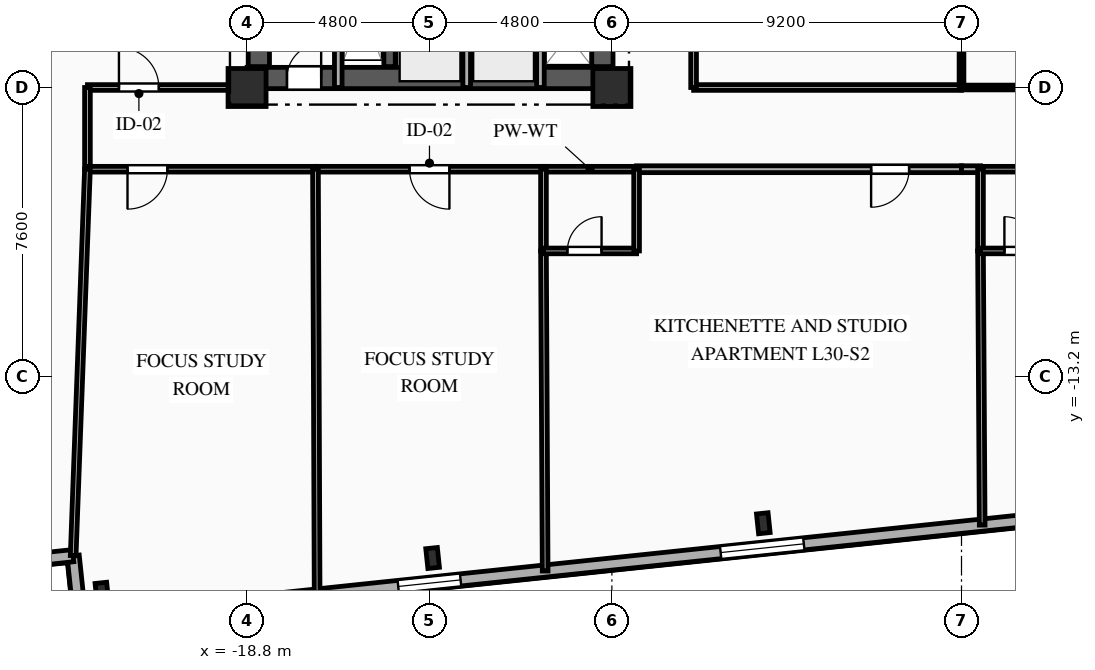
"""IFC4 building model, lengths in metres.
Left out: names, types, materials, properties, quantities, classifications, styles, units other than length and angle.
Written with IfcOpenShell. Run it as: python <this file> out.ifc"""

import sys

from ifc_helpers import new_model, si_unit, direction, frame, frame_2d, origin, origin_2d, place, context, subcontext, project, spatial, rectangle, i_section, extrude, element, fill, save


model = new_model("IFC4")
c1 = context("Model", 3, precision=1e-05, world=origin(), true_north=direction((0.0, 1.0)))
c2 = subcontext(c1, "Body", "Model", "MODEL_VIEW")
j1 = project(units=[si_unit("LENGTHUNIT", "METRE"), si_unit("PLANEANGLEUNIT", "RADIAN")], contexts=[c1])
p1 = place(None, origin())
s1 = spatial("IfcSite", under=j1, at=p1, CompositionType="ELEMENT")
p2 = place(p1, origin())
s2 = spatial("IfcBuilding", under=s1, at=p2, CompositionType="ELEMENT")
p3 = place(p2, frame((0.0, 0.0, 109.15)))
s3 = spatial("IfcBuildingStorey", under=s2, at=p3, CompositionType="ELEMENT", Elevation=109.15)
for number, where, z_axis, x_axis in (
    (1, (-18.8, -5.6, 0.0), (0.0, 0.0, 1.0), (1.0, 0.0, 0.0)),
    (2, (-9.2, -5.6, 0.0), (0.0, 0.0, 1.0), (1.0, 0.0, 0.0)),
):
    element("IfcColumn", number, at=place(p3, frame(where, z_axis=z_axis, x_axis=x_axis)), inside=s3, PredefinedType="COLUMN", context=c2, shape_type="SweptSolid", body=[
        extrude(rectangle(XDim=1.0, YDim=1.0, at=origin_2d()), origin(), (0.0, 0.0, 1.0), 3.35),
    ])
for number, where, z_axis, x_axis in (
    (3, (-22.619, -18.895, 0.0), (0.0, 0.0, 1.0), (0.995, 0.105, 0.0)),
    (4, (-13.917, -17.98, 0.0), (0.0, 0.0, 1.0), (0.995, 0.105, 0.0)),
    (5, (-5.215, -17.066, 0.0), (0.0, 0.0, 1.0), (0.995, 0.105, 0.0)),
):
    element("IfcColumn", number, at=place(p3, frame(where, z_axis=z_axis, x_axis=x_axis)), inside=s3, PredefinedType="COLUMN", context=c2, shape_type="SweptSolid", body=[
        extrude(i_section(OverallWidth=0.306, OverallDepth=0.524, WebThickness=0.021, FlangeThickness=0.04, FilletRadius=0.027, at=origin_2d()), origin(), (0.0, 0.0, 1.0), 3.35),
    ])
for number, where, z_axis, x_axis in (
    (6, (-23.198, -19.609, 0.0), (0.0, 0.0, 1.0), (-0.105, 0.995, 0.0)),
    (7, (-23.376, -17.919, 0.0), (0.0, 0.0, 1.0), (-0.995, -0.105, 0.0)),
):
    element("IfcWall", number, at=place(p3, frame(where, z_axis=z_axis, x_axis=x_axis)), inside=s3, PredefinedType="SOLIDWALL", context=c2, shape_type="SweptSolid", body=[
        extrude(rectangle(XDim=1.7, YDim=0.32, at=frame_2d((0.85, 0.0))), origin(), (0.0, 0.0, 1.0), 3.045),
    ])
p4 = place(p3, frame((30.307, -13.986, 0.0), z_axis=(0.0, 0.0, 1.0), x_axis=(-0.994521628355, -0.104531003701, 0.0)))
e8 = element("IfcWall", 8, at=p4, inside=s3, PredefinedType="SOLIDWALL", context=c2, shape_type="SweptSolid", body=[
    extrude(rectangle(XDim=53.8, YDim=0.32, at=frame_2d((26.9, 0.0))), origin(), (0.0, 0.0, 1.0), 3.045),
])
p5 = place(p4, frame((3.098, 0.0, 0.85)))
e9 = element("IfcOpeningElement", 9, at=p5, cuts=e8, PredefinedType="OPENING", context=c2, shape_type="SweptSolid", body=[
    extrude(rectangle(XDim=1.65, YDim=1.85, at=frame_2d((0.825, 0.925))), frame((0.0, 0.17, 0.0), z_axis=(0.0, -1.0, 0.0), x_axis=(1.0, 0.0, 0.0)), (0.0, 0.0, 1.0), 0.34),
])
p6 = place(p4, frame((9.302, 0.0, 0.85)))
e10 = element("IfcOpeningElement", 10, at=p6, cuts=e8, PredefinedType="OPENING", context=c2, shape_type="SweptSolid", body=[
    extrude(rectangle(XDim=1.65, YDim=1.85, at=frame_2d((0.825, 0.925))), frame((0.0, 0.17, 0.0), z_axis=(0.0, -1.0, 0.0), x_axis=(1.0, 0.0, 0.0)), (0.0, 0.0, 1.0), 0.34),
])
p7 = place(p4, frame((14.827, 0.0, 0.85)))
e11 = element("IfcOpeningElement", 11, at=p7, cuts=e8, PredefinedType="OPENING", context=c2, shape_type="SweptSolid", body=[
    extrude(rectangle(XDim=1.65, YDim=1.85, at=frame_2d((0.825, 0.925))), frame((0.0, 0.17, 0.0), z_axis=(0.0, -1.0, 0.0), x_axis=(1.0, 0.0, 0.0)), (0.0, 0.0, 1.0), 0.34),
])
p8 = place(p4, frame((23.078, 0.0, 0.85)))
e12 = element("IfcOpeningElement", 12, at=p8, cuts=e8, PredefinedType="OPENING", context=c2, shape_type="SweptSolid", body=[
    extrude(rectangle(XDim=2.2, YDim=1.85, at=frame_2d((1.1, 0.925))), frame((0.0, 0.17, 0.0), z_axis=(0.0, -1.0, 0.0), x_axis=(1.0, 0.0, 0.0)), (0.0, 0.0, 1.0), 0.34),
])
p9 = place(p4, frame((34.646, 0.0, 0.85)))
e13 = element("IfcOpeningElement", 13, at=p9, cuts=e8, PredefinedType="OPENING", context=c2, shape_type="SweptSolid", body=[
    extrude(rectangle(XDim=2.2, YDim=1.85, at=frame_2d((1.1, 0.925))), frame((0.0, 0.17, 0.0), z_axis=(0.0, -1.0, 0.0), x_axis=(1.0, 0.0, 0.0)), (0.0, 0.0, 1.0), 0.34),
])
p10 = place(p4, frame((43.728, 0.0, 0.85)))
e14 = element("IfcOpeningElement", 14, at=p10, cuts=e8, PredefinedType="OPENING", context=c2, shape_type="SweptSolid", body=[
    extrude(rectangle(XDim=1.65, YDim=1.85, at=frame_2d((0.825, 0.925))), frame((0.0, 0.17, 0.0), z_axis=(0.0, -1.0, 0.0), x_axis=(1.0, 0.0, 0.0)), (0.0, 0.0, 1.0), 0.34),
])
p11 = place(p4, frame((49.653, 0.0, 0.85)))
e15 = element("IfcOpeningElement", 15, at=p11, cuts=e8, PredefinedType="OPENING", context=c2, shape_type="SweptSolid", body=[
    extrude(rectangle(XDim=1.65, YDim=1.85, at=frame_2d((0.825, 0.925))), frame((0.0, 0.17, 0.0), z_axis=(0.0, -1.0, 0.0), x_axis=(1.0, 0.0, 0.0)), (0.0, 0.0, 1.0), 0.34),
])
p12 = place(p3, frame((-18.8, -5.35, 0.0), z_axis=(0.0, 0.0, 1.0), x_axis=(1.0, 0.0, 0.0)))
e16 = element("IfcWall", 16, at=p12, inside=s3, PredefinedType="SHEAR", context=c2, shape_type="SweptSolid", body=[
    extrude(rectangle(XDim=9.6, YDim=0.56, at=frame_2d((4.8, 0.0))), origin(), (0.0, 0.0, 1.0), 3.045),
])
p13 = place(p12, frame((1.05, 0.0, 0.0)))
e17 = element("IfcOpeningElement", 17, at=p13, cuts=e16, PredefinedType="OPENING", context=c2, shape_type="SweptSolid", body=[
    extrude(rectangle(XDim=0.9, YDim=2.1, at=frame_2d((0.45, 1.05))), frame((0.0, 0.29, 0.0), z_axis=(0.0, -1.0, 0.0), x_axis=(1.0, 0.0, 0.0)), (0.0, 0.0, 1.0), 0.58),
])
p14 = place(p3, frame((-18.49, -5.05, 0.0), z_axis=(0.0, 0.0, 1.0), x_axis=(0.0, 1.0, 0.0)))
e18 = element("IfcWall", 18, at=p14, inside=s3, PredefinedType="SHEAR", context=c2, shape_type="SweptSolid", body=[
    extrude(rectangle(XDim=10.1, YDim=0.56, at=frame_2d((5.05, 0.0))), origin(), (0.0, 0.0, 1.0), 3.045),
])
p15 = place(p3, frame((-9.45, -5.05, 0.0), z_axis=(0.0, 0.0, 1.0), x_axis=(0.0, 1.0, 0.0)))
e19 = element("IfcWall", 19, at=p15, inside=s3, PredefinedType="SHEAR", context=c2, shape_type="SweptSolid", body=[
    extrude(rectangle(XDim=10.1, YDim=0.56, at=frame_2d((5.05, 0.0))), origin(), (0.0, 0.0, 1.0), 3.045),
])
p16 = place(p15, frame((7.15, 0.0, 0.0)))
e20 = element("IfcOpeningElement", 20, at=p16, cuts=e19, PredefinedType="OPENING", context=c2, shape_type="SweptSolid", body=[
    extrude(rectangle(XDim=0.9, YDim=2.1, at=frame_2d((0.45, 1.05))), frame((0.0, 0.29, 0.0), z_axis=(0.0, -1.0, 0.0), x_axis=(1.0, 0.0, 0.0)), (0.0, 0.0, 1.0), 0.58),
])
p17 = place(p15, frame((2.4, 0.0, 0.0)))
e21 = element("IfcOpeningElement", 21, at=p17, cuts=e19, PredefinedType="OPENING", context=c2, shape_type="SweptSolid", body=[
    extrude(rectangle(XDim=1.2, YDim=2.15, at=frame_2d((0.6, 1.075))), frame((0.0, 0.29, 0.0), z_axis=(0.0, -1.0, 0.0), x_axis=(1.0, 0.0, 0.0)), (0.0, 0.0, 1.0), 0.58),
])
p18 = place(p3, frame((-15.05, -5.05, 0.0), z_axis=(0.0, 0.0, 1.0), x_axis=(0.0, 1.0, 0.0)))
e22 = element("IfcWall", 22, at=p18, inside=s3, PredefinedType="SHEAR", context=c2, shape_type="SweptSolid", body=[
    extrude(rectangle(XDim=10.1, YDim=0.3, at=frame_2d((5.05, 0.0))), origin(), (0.0, 0.0, 1.0), 3.045),
])
p19 = place(p3, frame((-16.4, -5.6, 0.0), z_axis=(0.0, 0.0, 1.0), x_axis=(0.0, 1.0, 0.0)))
e23 = element("IfcWall", 23, at=p19, inside=s3, PredefinedType="PARTITIONING", context=c2, shape_type="SweptSolid", body=[
    extrude(rectangle(XDim=3.49, YDim=0.2, at=frame_2d((1.745, 0.0))), origin(), (0.0, 0.0, 1.0), 3.045),
])
for number, where, z_axis, x_axis in (
    (24, (-13.02, -5.6, 0.0), (0.0, 0.0, 1.0), (0.0, 1.0, 0.0)),
    (25, (-11.08, -5.6, 0.0), (0.0, 0.0, 1.0), (0.0, 1.0, 0.0)),
):
    element("IfcWall", number, at=place(p3, frame(where, z_axis=z_axis, x_axis=x_axis)), inside=s3, PredefinedType="PARTITIONING", context=c2, shape_type="SweptSolid", body=[
        extrude(rectangle(XDim=2.25, YDim=0.2, at=frame_2d((1.125, 0.0))), origin(), (0.0, 0.0, 1.0), 3.045),
    ])
p20 = place(p3, frame((-23.0, -5.6, 0.0), z_axis=(0.0, 0.0, 1.0), x_axis=(1.0, 0.0, 0.0)))
e26 = element("IfcWall", 26, at=p20, inside=s3, PredefinedType="PARTITIONING", context=c2, shape_type="SweptSolid", body=[
    extrude(rectangle(XDim=4.2, YDim=0.15, at=frame_2d((2.1, 0.0))), origin(), (0.0, 0.0, 1.0), 3.045),
])
p21 = place(p20, frame((0.829, 0.0, 0.0)))
e27 = element("IfcOpeningElement", 27, at=p21, cuts=e26, PredefinedType="OPENING", context=c2, shape_type="SweptSolid", body=[
    extrude(rectangle(XDim=1.05, YDim=2.15, at=frame_2d((0.525, 1.075))), frame((0.0, 0.085, 0.0), z_axis=(0.0, -1.0, 0.0), x_axis=(1.0, 0.0, 0.0)), (0.0, 0.0, 1.0), 0.17),
])
p22 = place(p3, frame((-23.0, -7.75, 0.0), z_axis=(0.0, 0.0, 1.0), x_axis=(0.0, 1.0, 0.0)))
e28 = element("IfcWall", 28, at=p22, inside=s3, PredefinedType="PARTITIONING", context=c2, shape_type="SweptSolid", body=[
    extrude(rectangle(XDim=2.15, YDim=0.15, at=frame_2d((1.075, 0.0))), origin(), (0.0, 0.0, 1.0), 2.7),
])
p23 = place(p3, frame((-17.0, -7.75, 0.0), z_axis=(0.0, 0.0, 1.0), x_axis=(-1.0, 0.0, 0.0)))
e29 = element("IfcWall", 29, at=p23, inside=s3, PredefinedType="PARTITIONING", context=c2, shape_type="SweptSolid", body=[
    extrude(rectangle(XDim=6.0, YDim=0.15, at=frame_2d((3.0, 0.0))), origin(), (0.0, 0.0, 1.0), 3.045),
])
p24 = place(p23, frame((3.896, 0.0, 0.0)))
e30 = element("IfcOpeningElement", 30, at=p24, cuts=e29, PredefinedType="OPENING", context=c2, shape_type="SweptSolid", body=[
    extrude(rectangle(XDim=1.05, YDim=2.15, at=frame_2d((0.525, 1.075))), frame((0.0, 0.085, 0.0), z_axis=(0.0, -1.0, 0.0), x_axis=(1.0, 0.0, 0.0)), (0.0, 0.0, 1.0), 0.17),
])
p25 = place(p3, frame((-11.0, -7.75, 0.0), z_axis=(0.0, 0.0, 1.0), x_axis=(-1.0, 0.0, 0.0)))
e31 = element("IfcWall", 31, at=p25, inside=s3, PredefinedType="PARTITIONING", context=c2, shape_type="SweptSolid", body=[
    extrude(rectangle(XDim=6.0, YDim=0.15, at=frame_2d((3.0, 0.0))), origin(), (0.0, 0.0, 1.0), 3.045),
])
p26 = place(p25, frame((2.475, 0.0, 0.0)))
e32 = element("IfcOpeningElement", 32, at=p26, cuts=e31, PredefinedType="OPENING", context=c2, shape_type="SweptSolid", body=[
    extrude(rectangle(XDim=1.05, YDim=2.15, at=frame_2d((0.525, 1.075))), frame((0.0, 0.085, 0.0), z_axis=(0.0, -1.0, 0.0), x_axis=(1.0, 0.0, 0.0)), (0.0, 0.0, 1.0), 0.17),
])
p27 = place(p3, frame((0.0, -7.75, 0.0), z_axis=(0.0, 0.0, 1.0), x_axis=(-1.0, 0.0, 0.0)))
e33 = element("IfcWall", 33, at=p27, inside=s3, PredefinedType="PARTITIONING", context=c2, shape_type="SweptSolid", body=[
    extrude(rectangle(XDim=8.55, YDim=0.18, at=frame_2d((4.275, 0.0))), origin(), (0.0, 0.0, 1.0), 3.045),
])
p28 = place(p27, frame((1.379, 0.0, 0.0)))
e34 = element("IfcOpeningElement", 34, at=p28, cuts=e33, PredefinedType="OPENING", context=c2, shape_type="SweptSolid", body=[
    extrude(rectangle(XDim=1.0, YDim=2.15, at=frame_2d((0.5, 1.075))), frame((0.0, 0.1, 0.0), z_axis=(0.0, -1.0, 0.0), x_axis=(1.0, 0.0, 0.0)), (0.0, 0.0, 1.0), 0.2),
])
p29 = place(p3, frame((-8.55, -7.75, 0.0), z_axis=(0.0, 0.0, 1.0), x_axis=(-1.0, 0.0, 0.0)))
e35 = element("IfcWall", 35, at=p29, inside=s3, PredefinedType="PLUMBINGWALL", context=c2, shape_type="SweptSolid", body=[
    extrude(rectangle(XDim=2.45, YDim=0.15, at=frame_2d((1.225, 0.0))), origin(), (0.0, 0.0, 1.0), 3.045),
])
p30 = place(p3, frame((-7.05, -5.6, 0.0), z_axis=(0.0, 0.0, 1.0), x_axis=(1.0, 0.0, 0.0)))
e36 = element("IfcWall", 36, at=p30, inside=s3, PredefinedType="PARTITIONING", context=c2, shape_type="SweptSolid", body=[
    extrude(rectangle(XDim=7.05, YDim=0.15, at=frame_2d((3.525, 0.0))), origin(), (0.0, 0.0, 1.0), 2.53),
])
p31 = place(p3, frame((0.5, -7.75, 0.0), z_axis=(0.0, 0.0, 1.0), x_axis=(-1.0, 0.0, 0.0)))
e37 = element("IfcWall", 37, at=p31, inside=s3, PredefinedType="PARTITIONING", context=c2, shape_type="SweptSolid", body=[
    extrude(rectangle(XDim=0.5, YDim=0.18, at=frame_2d((0.25, 0.0))), origin(), (0.0, 0.0, 1.0), 3.045),
])
p32 = place(p3, frame((2.95, -7.75, 0.0), z_axis=(0.0, 0.0, 1.0), x_axis=(-1.0, 0.0, 0.0)))
e38 = element("IfcWall", 38, at=p32, inside=s3, PredefinedType="PLUMBINGWALL", context=c2, shape_type="SweptSolid", body=[
    extrude(rectangle(XDim=2.45, YDim=0.15, at=frame_2d((1.225, 0.0))), origin(), (0.0, 0.0, 1.0), 3.045),
])
p33 = place(p3, frame((0.0, -5.6, 0.0), z_axis=(0.0, 0.0, 1.0), x_axis=(1.0, 0.0, 0.0)))
e39 = element("IfcWall", 39, at=p33, inside=s3, PredefinedType="PARTITIONING", context=c2, shape_type="SweptSolid", body=[
    extrude(rectangle(XDim=7.05, YDim=0.125, at=frame_2d((3.525, 0.0))), origin(), (0.0, 0.0, 1.0), 2.53),
])
p34 = place(p3, frame((-7.05, 8.5, 0.0), z_axis=(0.0, 0.0, 1.0), x_axis=(0.0, -1.0, 0.0)))
e40 = element("IfcWall", 40, at=p34, inside=s3, PredefinedType="PARTITIONING", context=c2, shape_type="SweptSolid", body=[
    extrude(rectangle(XDim=14.1, YDim=0.15, at=frame_2d((7.05, 0.0))), origin(), (0.0, 0.0, 1.0), 3.045),
])
p35 = place(p34, frame((8.074, 0.0, 0.0)))
e41 = element("IfcOpeningElement", 41, at=p35, cuts=e40, PredefinedType="OPENING", context=c2, shape_type="SweptSolid", body=[
    extrude(rectangle(XDim=0.95, YDim=2.1, at=frame_2d((0.475, 1.05))), frame((0.0, 0.085, 0.0), z_axis=(0.0, -1.0, 0.0), x_axis=(1.0, 0.0, 0.0)), (0.0, 0.0, 1.0), 0.17),
])
p36 = place(p3, frame((-23.0, -7.75, 0.0), z_axis=(0.0, 0.0, 1.0), x_axis=(-0.036924695214, -0.999318050914, 0.0)))
e42 = element("IfcWall", 42, at=p36, inside=s3, PredefinedType="PARTITIONING", context=c2, shape_type="SweptSolid", body=[
    extrude(rectangle(XDim=10.176, YDim=0.15, at=frame_2d((5.088, 0.0))), origin(), (0.0, 0.0, 1.0), 3.045),
])
p37 = place(p3, frame((-17.0, -7.75, 0.0), z_axis=(0.0, 0.0, 1.0), x_axis=(0.003922478487, -0.999992307052, 0.0)))
e43 = element("IfcWall", 43, at=p37, inside=s3, PredefinedType="PARTITIONING", context=c2, shape_type="SweptSolid", body=[
    extrude(rectangle(XDim=11.203, YDim=0.15, at=frame_2d((5.602, 0.0))), origin(), (0.0, 0.0, 1.0), 3.045),
])
p38 = place(p3, frame((-11.0, -9.9, 0.0), z_axis=(0.0, 0.0, 1.0), x_axis=(0.005217320294, -0.999986389692, 0.0)))
e44 = element("IfcWall", 44, at=p38, inside=s3, PredefinedType="PARTITIONING", context=c2, shape_type="SweptSolid", body=[
    extrude(rectangle(XDim=8.423, YDim=0.15, at=frame_2d((4.211, 0.0))), origin(), (0.0, 0.0, 1.0), 3.045),
])
p39 = place(p3, frame((-11.0, -7.75, 0.0), z_axis=(0.0, 0.0, 1.0), x_axis=(0.0, -1.0, 0.0)))
e45 = element("IfcWall", 45, at=p39, inside=s3, PredefinedType="PLUMBINGWALL", context=c2, shape_type="SweptSolid", body=[
    extrude(rectangle(XDim=2.15, YDim=0.15, at=frame_2d((1.075, 0.0))), origin(), (0.0, 0.0, 1.0), 3.045),
])
p40 = place(p3, frame((-11.0, -9.9, 0.0), z_axis=(0.0, 0.0, 1.0), x_axis=(1.0, 0.0, 0.0)))
e46 = element("IfcWall", 46, at=p40, inside=s3, PredefinedType="PLUMBINGWALL", context=c2, shape_type="SweptSolid", body=[
    extrude(rectangle(XDim=2.45, YDim=0.15, at=frame_2d((1.225, 0.0))), origin(), (0.0, 0.0, 1.0), 3.045),
])
p41 = place(p40, frame((0.629, 0.0, 0.0)))
e47 = element("IfcOpeningElement", 47, at=p41, cuts=e46, PredefinedType="OPENING", context=c2, shape_type="SweptSolid", body=[
    extrude(rectangle(XDim=0.9, YDim=2.1, at=frame_2d((0.45, 1.05))), frame((0.0, 0.085, 0.0), z_axis=(0.0, -1.0, 0.0), x_axis=(1.0, 0.0, 0.0)), (0.0, 0.0, 1.0), 0.17),
])
p42 = place(p3, frame((-8.55, -9.9, 0.0), z_axis=(0.0, 0.0, 1.0), x_axis=(0.0, 1.0, 0.0)))
e48 = element("IfcWall", 48, at=p42, inside=s3, PredefinedType="PLUMBINGWALL", context=c2, shape_type="SweptSolid", body=[
    extrude(rectangle(XDim=2.15, YDim=0.15, at=frame_2d((1.075, 0.0))), origin(), (0.0, 0.0, 1.0), 3.045),
])
p43 = place(p3, frame((0.5, -9.9, 0.0), z_axis=(0.0, 0.0, 1.0), x_axis=(0.006091463685, -0.999981446863, 0.0)))
e49 = element("IfcWall", 49, at=p43, inside=s3, PredefinedType="PARTITIONING", context=c2, shape_type="SweptSolid", body=[
    extrude(rectangle(XDim=7.214, YDim=0.15, at=frame_2d((3.607, 0.0))), origin(), (0.0, 0.0, 1.0), 3.045),
])
p44 = place(p3, frame((0.5, -7.75, 0.0), z_axis=(0.0, 0.0, 1.0), x_axis=(0.0, -1.0, 0.0)))
e50 = element("IfcWall", 50, at=p44, inside=s3, PredefinedType="PLUMBINGWALL", context=c2, shape_type="SweptSolid", body=[
    extrude(rectangle(XDim=2.15, YDim=0.15, at=frame_2d((1.075, 0.0))), origin(), (0.0, 0.0, 1.0), 3.045),
])
p45 = place(p3, frame((0.5, -9.9, 0.0), z_axis=(0.0, 0.0, 1.0), x_axis=(1.0, 0.0, 0.0)))
e51 = element("IfcWall", 51, at=p45, inside=s3, PredefinedType="PLUMBINGWALL", context=c2, shape_type="SweptSolid", body=[
    extrude(rectangle(XDim=2.45, YDim=0.15, at=frame_2d((1.225, 0.0))), origin(), (0.0, 0.0, 1.0), 3.045),
])
p46 = place(p45, frame((0.629, 0.0, 0.0)))
e52 = element("IfcOpeningElement", 52, at=p46, cuts=e51, PredefinedType="OPENING", context=c2, shape_type="SweptSolid", body=[
    extrude(rectangle(XDim=0.9, YDim=2.1, at=frame_2d((0.45, 1.05))), frame((0.0, 0.085, 0.0), z_axis=(0.0, -1.0, 0.0), x_axis=(1.0, 0.0, 0.0)), (0.0, 0.0, 1.0), 0.17),
])
p47 = place(p3, frame((0.0, 8.5, 0.0), z_axis=(0.0, 0.0, 1.0), x_axis=(0.0, -1.0, 0.0)))
e53 = element("IfcWall", 53, at=p47, inside=s3, PredefinedType="PARTITIONING", context=c2, shape_type="SweptSolid", body=[
    extrude(rectangle(XDim=14.1, YDim=0.125, at=frame_2d((7.05, 0.0))), origin(), (0.0, 0.0, 1.0), 3.045),
])
p48 = place(p9, origin())
e54 = element("IfcWindow", 54, at=p48, inside=s3, PartitioningType="SINGLE_PANEL", PredefinedType="WINDOW", context=c2, shape_type="SweptSolid", body=[
    extrude(rectangle(XDim=2.2, YDim=1.85, at=frame_2d((1.1, 0.925))), frame((0.0, 0.03, 0.0), z_axis=(0.0, -1.0, 0.0), x_axis=(1.0, 0.0, 0.0)), (0.0, 0.0, 1.0), 0.06),
])
fill(e13, e54)
p49 = place(p10, origin())
e55 = element("IfcWindow", 55, at=p49, inside=s3, PartitioningType="SINGLE_PANEL", PredefinedType="WINDOW", context=c2, shape_type="SweptSolid", body=[
    extrude(rectangle(XDim=1.65, YDim=1.85, at=frame_2d((0.825, 0.925))), frame((0.0, 0.03, 0.0), z_axis=(0.0, -1.0, 0.0), x_axis=(1.0, 0.0, 0.0)), (0.0, 0.0, 1.0), 0.06),
])
fill(e14, e55)
p50 = place(p13, origin())
e56 = element("IfcDoor", 56, at=p50, inside=s3, OperationType="SINGLE_SWING_RIGHT", PredefinedType="DOOR", context=c2, shape_type="SweptSolid", body=[
    extrude(rectangle(XDim=0.9, YDim=2.1, at=frame_2d((0.45, 1.05))), frame((0.0, 0.025, 0.0), z_axis=(0.0, -1.0, 0.0), x_axis=(1.0, 0.0, 0.0)), (0.0, 0.0, 1.0), 0.05),
])
fill(e17, e56)
p51 = place(p21, origin())
e57 = element("IfcDoor", 57, at=p51, inside=s3, OperationType="SINGLE_SWING_LEFT", PredefinedType="DOOR", context=c2, shape_type="SweptSolid", body=[
    extrude(rectangle(XDim=1.05, YDim=2.15, at=frame_2d((0.525, 1.075))), frame((0.0, 0.025, 0.0), z_axis=(0.0, -1.0, 0.0), x_axis=(1.0, 0.0, 0.0)), (0.0, 0.0, 1.0), 0.05),
])
fill(e27, e57)
p52 = place(p24, origin())
e58 = element("IfcDoor", 58, at=p52, inside=s3, OperationType="SINGLE_SWING_RIGHT", PredefinedType="DOOR", context=c2, shape_type="SweptSolid", body=[
    extrude(rectangle(XDim=1.05, YDim=2.15, at=frame_2d((0.525, 1.075))), frame((0.0, 0.025, 0.0), z_axis=(0.0, -1.0, 0.0), x_axis=(1.0, 0.0, 0.0)), (0.0, 0.0, 1.0), 0.05),
])
fill(e30, e58)
p53 = place(p26, origin())
e59 = element("IfcDoor", 59, at=p53, inside=s3, OperationType="SINGLE_SWING_LEFT", PredefinedType="DOOR", context=c2, shape_type="SweptSolid", body=[
    extrude(rectangle(XDim=1.05, YDim=2.15, at=frame_2d((0.525, 1.075))), frame((0.0, 0.025, 0.0), z_axis=(0.0, -1.0, 0.0), x_axis=(1.0, 0.0, 0.0)), (0.0, 0.0, 1.0), 0.05),
])
fill(e32, e59)
p54 = place(p28, origin())
e60 = element("IfcDoor", 60, at=p54, inside=s3, OperationType="SINGLE_SWING_RIGHT", PredefinedType="DOOR", context=c2, shape_type="SweptSolid", body=[
    extrude(rectangle(XDim=1.0, YDim=2.15, at=frame_2d((0.5, 1.075))), frame((0.0, 0.025, 0.0), z_axis=(0.0, -1.0, 0.0), x_axis=(1.0, 0.0, 0.0)), (0.0, 0.0, 1.0), 0.05),
])
fill(e34, e60)
p55 = place(p41, origin())
e61 = element("IfcDoor", 61, at=p55, inside=s3, OperationType="SINGLE_SWING_RIGHT", PredefinedType="DOOR", context=c2, shape_type="SweptSolid", body=[
    extrude(rectangle(XDim=0.9, YDim=2.1, at=frame_2d((0.45, 1.05))), frame((0.0, 0.025, 0.0), z_axis=(0.0, -1.0, 0.0), x_axis=(1.0, 0.0, 0.0)), (0.0, 0.0, 1.0), 0.05),
])
fill(e47, e61)
p56 = place(p46, origin())
e62 = element("IfcDoor", 62, at=p56, inside=s3, OperationType="SINGLE_SWING_LEFT", PredefinedType="DOOR", context=c2, shape_type="SweptSolid", body=[
    extrude(rectangle(XDim=0.9, YDim=2.1, at=frame_2d((0.45, 1.05))), frame((0.0, 0.025, 0.0), z_axis=(0.0, -1.0, 0.0), x_axis=(1.0, 0.0, 0.0)), (0.0, 0.0, 1.0), 0.05),
])
fill(e52, e62)
save(model, sys.argv[1])
